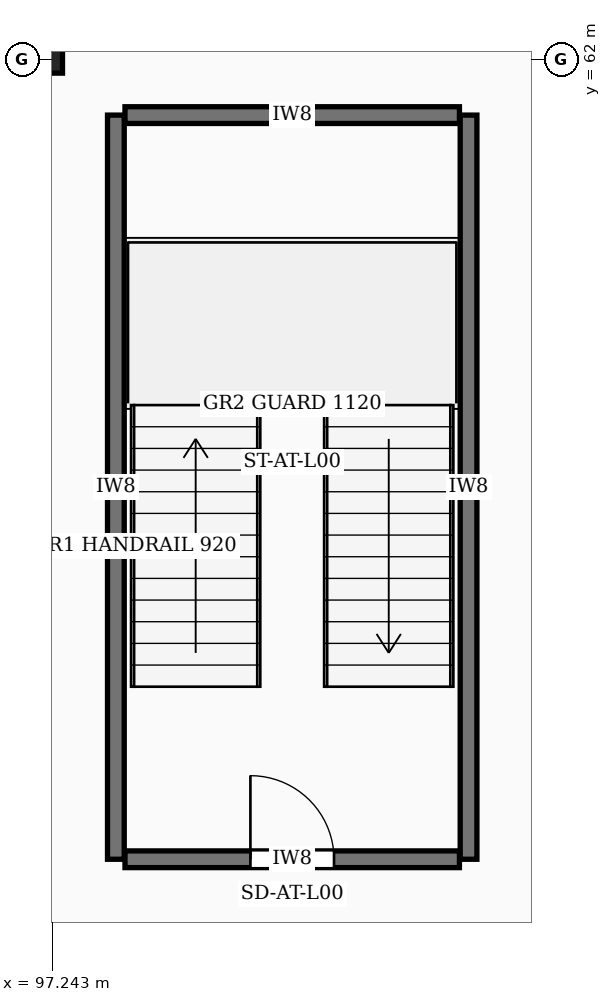
"""IFC4 building model, lengths in metres.
Left out: names, types, materials, properties, quantities, classifications, styles, units other than length and angle.
Written with IfcOpenShell. Run it as: python <this file> out.ifc"""

import sys

from ifc_helpers import new_model, si_unit, direction, frame, frame_2d, origin, origin_2d, place, context, subcontext, project, spatial, rectangle, hollow_circle, extrude, element, fill, save


model = new_model("IFC4")
c1 = context("Model", 3, precision=1e-05, world=origin(), true_north=direction((0.0, 1.0)))
c2 = subcontext(c1, "Body", "Model", "MODEL_VIEW")
j1 = project(units=[si_unit("LENGTHUNIT", "METRE"), si_unit("PLANEANGLEUNIT", "RADIAN")], contexts=[c1])
p1 = place(None, origin())
s1 = spatial("IfcSite", under=j1, at=p1, CompositionType="ELEMENT")
p2 = place(p1, origin())
s2 = spatial("IfcBuilding", under=s1, at=p2, CompositionType="ELEMENT")
p3 = place(p2, origin())
s3 = spatial("IfcBuildingStorey", under=s2, at=p3, CompositionType="ELEMENT", Elevation=0.0)
p4 = place(p3, frame((97.2, 62.0, 0.0), z_axis=(0.0, 0.0, 1.0), x_axis=(1.0, 0.0, 0.0)))
e1 = element("IfcColumn", 1, at=p4, inside=s3, PredefinedType="COLUMN", context=c2, shape_type="SweptSolid", body=[
    extrude(hollow_circle(Radius=0.178, WallThickness=0.016, at=origin_2d()), origin(), (0.0, 0.0, 1.0), 4.8),
])
for number, where, z_axis, x_axis in (
    (2, (98.08, 51.48, 0.0), (0.0, 0.0, 1.0), (0.0, 1.0, 0.0)),
    (3, (102.72, 51.48, 0.0), (0.0, 0.0, 1.0), (0.0, 1.0, 0.0)),
):
    element("IfcWall", number, at=place(p3, frame(where, z_axis=z_axis, x_axis=x_axis)), inside=s3, PredefinedType="SHEAR", context=c2, shape_type="SweptSolid", body=[
        extrude(rectangle(XDim=9.79, YDim=0.22, at=frame_2d((4.895, 0.0))), origin(), (0.0, 0.0, 1.0), 4.56),
    ])
p5 = place(p3, frame((98.2, 61.27, 0.0), z_axis=(0.0, 0.0, 1.0), x_axis=(1.0, 0.0, 0.0)))
e4 = element("IfcWall", 4, at=p5, inside=s3, PredefinedType="SHEAR", context=c2, shape_type="SweptSolid", body=[
    extrude(rectangle(XDim=4.4, YDim=0.22, at=frame_2d((2.2, 0.0))), origin(), (0.0, 0.0, 1.0), 4.56),
])
p6 = place(p3, frame((98.2, 51.48, 0.0), z_axis=(0.0, 0.0, 1.0), x_axis=(1.0, 0.0, 0.0)))
e5 = element("IfcWall", 5, at=p6, inside=s3, PredefinedType="SHEAR", context=c2, shape_type="SweptSolid", body=[
    extrude(rectangle(XDim=4.4, YDim=0.22, at=frame_2d((2.2, 0.0))), origin(), (0.0, 0.0, 1.0), 4.56),
])
p7 = place(p6, frame((1.65, 0.0, 0.0)))
e6 = element("IfcOpeningElement", 6, at=p7, cuts=e5, PredefinedType="OPENING", context=c2, shape_type="SweptSolid", body=[
    extrude(rectangle(XDim=1.1, YDim=2.2, at=frame_2d((0.55, 1.1))), frame((0.0, 0.12, 0.0), z_axis=(0.0, -1.0, 0.0), x_axis=(1.0, 0.0, 0.0)), (0.0, 0.0, 1.0), 0.24),
])
p8 = place(p7, origin())
e7 = element("IfcDoor", 7, at=p8, inside=s3, OperationType="SINGLE_SWING_LEFT", PredefinedType="DOOR", context=c2, shape_type="SweptSolid", body=[
    extrude(rectangle(XDim=1.1, YDim=2.2, at=frame_2d((0.55, 1.1))), frame((0.0, 0.025, 0.0), z_axis=(0.0, -1.0, 0.0), x_axis=(1.0, 0.0, 0.0)), (0.0, 0.0, 1.0), 0.05),
])
fill(e6, e7)
save(model, sys.argv[1])
